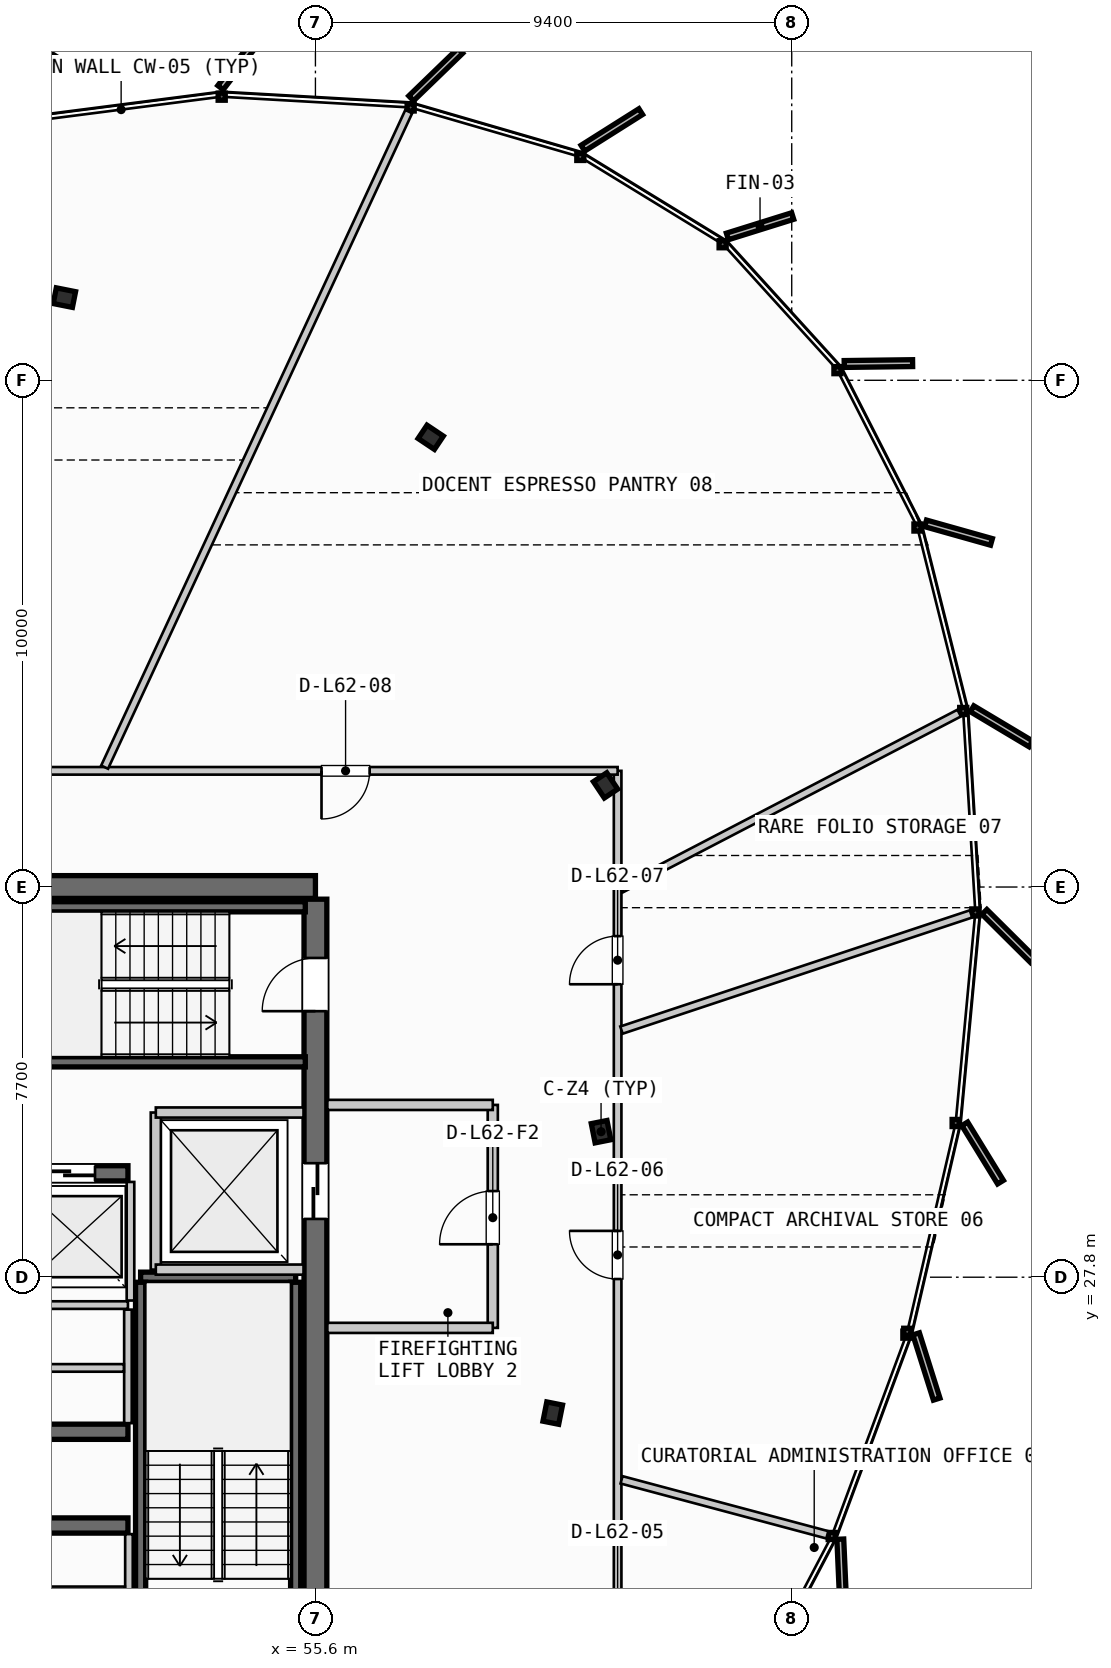
"""IFC4 building model, lengths in metres.
Left out: names, types, materials, properties, quantities, classifications, styles, units other than length and angle.
Written with IfcOpenShell. Run it as: python <this file> out.ifc"""

import sys

from ifc_helpers import new_model, si_unit, direction, frame, frame_2d, origin, origin_2d, place, context, subcontext, project, spatial, rectangle, i_section, extrude, source, transform, mapped, element, fill, save


model = new_model("IFC4")
c1 = context("Model", 3, precision=1e-05, world=origin(), true_north=direction((0.0, 1.0)))
c2 = subcontext(c1, "Body", "Model", "MODEL_VIEW")
j1 = project(units=[si_unit("LENGTHUNIT", "METRE"), si_unit("PLANEANGLEUNIT", "RADIAN")], contexts=[c1])
p1 = place(None, origin())
s1 = spatial("IfcSite", under=j1, at=p1, CompositionType="ELEMENT")
p2 = place(p1, origin())
s2 = spatial("IfcBuilding", under=s1, at=p2, CompositionType="ELEMENT")
p3 = place(p2, frame((0.0, 0.0, 238.75)))
s3 = spatial("IfcBuildingStorey", under=s2, at=p3, CompositionType="ELEMENT", Elevation=238.75)
p4 = place(p3, frame((55.6, 35.5, 0.0), z_axis=(0.0, 0.0, 1.0), x_axis=(-1.0, 0.0, 0.0)))
e1 = element("IfcWall", 1, at=p4, inside=s3, PredefinedType="SHEAR", context=c2, shape_type="SweptSolid", body=[
    extrude(rectangle(XDim=17.6, YDim=0.45, at=frame_2d((8.8, 0.0))), origin(), (0.0, 0.0, 1.0), 3.21),
])
p5 = place(p4, frame((8.05, 0.0, 0.0)))
e2 = element("IfcOpeningElement", 2, at=p5, cuts=e1, PredefinedType="OPENING", context=c2, shape_type="SweptSolid", body=[
    extrude(rectangle(XDim=1.5, YDim=2.2, at=frame_2d((0.75, 1.1))), frame((0.0, 0.235, 0.0), z_axis=(0.0, -1.0, 0.0), x_axis=(1.0, 0.0, 0.0)), (0.0, 0.0, 1.0), 0.47),
])
p6 = place(p4, frame((15.1, 0.0, 0.0)))
e3 = element("IfcOpeningElement", 3, at=p6, cuts=e1, PredefinedType="OPENING", context=c2, shape_type="SweptSolid", body=[
    extrude(rectangle(XDim=0.95, YDim=2.15, at=frame_2d((0.475, 1.075))), frame((0.0, 0.235, 0.0), z_axis=(0.0, -1.0, 0.0), x_axis=(1.0, 0.0, 0.0)), (0.0, 0.0, 1.0), 0.47),
])
p7 = place(p4, frame((12.9, 0.0, 0.0)))
e4 = element("IfcOpeningElement", 4, at=p7, cuts=e1, PredefinedType="OPENING", context=c2, shape_type="SweptSolid", body=[
    extrude(rectangle(XDim=0.9, YDim=2.15, at=frame_2d((0.45, 1.075))), frame((0.0, 0.235, 0.0), z_axis=(0.0, -1.0, 0.0), x_axis=(1.0, 0.0, 0.0)), (0.0, 0.0, 1.0), 0.47),
])
p8 = place(p4, frame((10.6, 0.0, 0.0)))
e5 = element("IfcOpeningElement", 5, at=p8, cuts=e1, PredefinedType="OPENING", context=c2, shape_type="SweptSolid", body=[
    extrude(rectangle(XDim=0.95, YDim=2.15, at=frame_2d((0.475, 1.075))), frame((0.0, 0.235, 0.0), z_axis=(0.0, -1.0, 0.0), x_axis=(1.0, 0.0, 0.0)), (0.0, 0.0, 1.0), 0.47),
])
p9 = place(p3, frame((55.6, 20.34, 0.0), z_axis=(0.0, 0.0, 1.0), x_axis=(0.0, 1.0, 0.0)))
e6 = element("IfcWall", 6, at=p9, inside=s3, PredefinedType="SHEAR", context=c2, shape_type="SweptSolid", body=[
    extrude(rectangle(XDim=14.92, YDim=0.45, at=frame_2d((7.46, 0.0))), origin(), (0.0, 0.0, 1.0), 3.21),
])
p10 = place(p9, frame((12.71, 0.0, 0.0)))
e7 = element("IfcOpeningElement", 7, at=p10, cuts=e6, PredefinedType="OPENING", context=c2, shape_type="SweptSolid", body=[
    extrude(rectangle(XDim=1.05, YDim=2.15, at=frame_2d((0.525, 1.075))), frame((0.0, 0.235, 0.0), z_axis=(0.0, -1.0, 0.0), x_axis=(1.0, 0.0, 0.0)), (0.0, 0.0, 1.0), 0.47),
])
p11 = place(p9, frame((8.61, 0.0, 0.0)))
e8 = element("IfcOpeningElement", 8, at=p11, cuts=e6, PredefinedType="OPENING", context=c2, shape_type="SweptSolid", body=[
    extrude(rectangle(XDim=1.1, YDim=2.2, at=frame_2d((0.55, 1.1))), frame((0.0, 0.235, 0.0), z_axis=(0.0, -1.0, 0.0), x_axis=(1.0, 0.0, 0.0)), (0.0, 0.0, 1.0), 0.47),
])
p12 = place(p3, frame((47.65, 22.9, 0.0), z_axis=(0.0, 0.0, 1.0), x_axis=(1.0, 0.0, 0.0)))
e9 = element("IfcWall", 9, at=p12, inside=s3, PredefinedType="SHEAR", context=c2, shape_type="SweptSolid", body=[
    extrude(rectangle(XDim=4.25, YDim=0.3, at=frame_2d((2.125, 0.0))), origin(), (0.0, 0.0, 1.0), 3.21),
])
p13 = place(p3, frame((47.65, 24.75, 0.0), z_axis=(0.0, 0.0, 1.0), x_axis=(1.0, 0.0, 0.0)))
e10 = element("IfcWall", 10, at=p13, inside=s3, PredefinedType="SHEAR", context=c2, shape_type="SweptSolid", body=[
    extrude(rectangle(XDim=4.25, YDim=0.3, at=frame_2d((2.125, 0.0))), origin(), (0.0, 0.0, 1.0), 3.21),
])
p14 = place(p13, frame((1.55, 0.0, 0.0)))
e11 = element("IfcOpeningElement", 11, at=p14, cuts=e10, PredefinedType="OPENING", context=c2, shape_type="SweptSolid", body=[
    extrude(rectangle(XDim=0.95, YDim=2.15, at=frame_2d((0.475, 1.075))), frame((0.0, 0.16, 0.0), z_axis=(0.0, -1.0, 0.0), x_axis=(1.0, 0.0, 0.0)), (0.0, 0.0, 1.0), 0.32),
])
p15 = place(p3, frame((47.65, 29.85, 0.0), z_axis=(0.0, 0.0, 1.0), x_axis=(1.0, 0.0, 0.0)))
e12 = element("IfcWall", 12, at=p15, inside=s3, PredefinedType="SHEAR", context=c2, shape_type="SweptSolid", body=[
    extrude(rectangle(XDim=4.25, YDim=0.3, at=frame_2d((2.125, 0.0))), origin(), (0.0, 0.0, 1.0), 3.21),
])
p16 = place(p15, frame((0.45, 0.0, 0.0)))
e13 = element("IfcOpeningElement", 13, at=p16, cuts=e12, PredefinedType="OPENING", context=c2, shape_type="SweptSolid", body=[
    extrude(rectangle(XDim=1.1, YDim=2.2, at=frame_2d((0.55, 1.1))), frame((0.0, 0.16, 0.0), z_axis=(0.0, -1.0, 0.0), x_axis=(1.0, 0.0, 0.0)), (0.0, 0.0, 1.0), 0.32),
])
p17 = place(p15, frame((2.5, 0.0, 0.0)))
e14 = element("IfcOpeningElement", 14, at=p17, cuts=e12, PredefinedType="OPENING", context=c2, shape_type="SweptSolid", body=[
    extrude(rectangle(XDim=1.1, YDim=2.2, at=frame_2d((0.55, 1.1))), frame((0.0, 0.16, 0.0), z_axis=(0.0, -1.0, 0.0), x_axis=(1.0, 0.0, 0.0)), (0.0, 0.0, 1.0), 0.32),
])
m1 = source(origin(), c2, "Body", "SweptSolid", [
    extrude(i_section(OverallWidth=0.387, OverallDepth=0.316, WebThickness=0.019, FlangeThickness=0.028, FilletRadius=0.015, at=origin_2d()), origin(), (0.0, 0.0, 1.0), 3.21),
])
for number, where, z_axis, x_axis in (
    (15, (61.237, 30.672, 0.0), (0.0, 0.0, 1.0), (0.981, 0.195, 0.0)),
    (16, (61.326, 37.506, 0.0), (0.0, 0.0, 1.0), (0.831, 0.556, 0.0)),
    (17, (57.875, 44.375, 0.0), (0.0, 0.0, 1.0), (0.556, 0.831, 0.0)),
    (18, (50.645, 47.132, 0.0), (0.0, 0.0, 1.0), (0.195, 0.981, 0.0)),
    (19, (60.284, 25.118, 0.0), (0.0, 0.0, 1.0), (0.981, -0.195, 0.0)),
):
    element("IfcColumn", number, at=place(p3, frame(where, z_axis=z_axis, x_axis=x_axis)), inside=s3, PredefinedType="COLUMN", context=c2, shape_type="MappedRepresentation", body=[
        mapped(m1, transform((0.0, 0.0, 0.0), scale=1.0)),
    ])
p18 = place(p3, frame((52.15, 27.8, 0.0), z_axis=(0.0, 0.0, 1.0), x_axis=(1.0, 0.0, 0.0)))
e20 = element("IfcWall", 20, at=p18, inside=s3, PredefinedType="SHEAR", context=c2, shape_type="SweptSolid", body=[
    extrude(rectangle(XDim=3.06, YDim=0.2, at=frame_2d((1.53, 0.0))), origin(), (0.0, 0.0, 1.0), 3.21),
])
for number, where, z_axis, x_axis in (
    (21, (55.21, 27.7, 0.0), (0.0, 0.0, 1.0), (0.0, -1.0, 0.0)),
    (22, (52.15, 20.35, 0.0), (0.0, 0.0, 1.0), (0.0, 1.0, 0.0)),
    (23, (48.05, 35.11, 0.0), (0.0, 0.0, 1.0), (1.0, 0.0, 0.0)),
    (24, (55.4, 32.05, 0.0), (0.0, 0.0, 1.0), (-1.0, 0.0, 0.0)),
):
    element("IfcWall", number, at=place(p3, frame(where, z_axis=z_axis, x_axis=x_axis)), inside=s3, PredefinedType="SHEAR", context=c2, shape_type="SweptSolid", body=[
        extrude(rectangle(XDim=7.35, YDim=0.2, at=frame_2d((3.675, 0.0))), origin(), (0.0, 0.0, 1.0), 3.21),
    ])
p19 = place(p3, frame((52.45, 27.95, 0.0), z_axis=(0.0, 0.0, 1.0), x_axis=(0.0, 1.0, 0.0)))
e25 = element("IfcWall", 25, at=p19, inside=s3, PredefinedType="PARTITIONING", context=c2, shape_type="SweptSolid", body=[
    extrude(rectangle(XDim=3.1, YDim=0.2, at=frame_2d((1.55, 0.0))), origin(), (0.0, 0.0, 1.0), 2.28),
])
for number, where, z_axis, x_axis in (
    (26, (52.45, 27.95, 0.0), (0.0, 0.0, 1.0), (1.0, 0.0, 0.0)),
    (27, (52.45, 31.05, 0.0), (0.0, 0.0, 1.0), (1.0, 0.0, 0.0)),
):
    element("IfcWall", number, at=place(p3, frame(where, z_axis=z_axis, x_axis=x_axis)), inside=s3, PredefinedType="PARTITIONING", context=c2, shape_type="SweptSolid", body=[
        extrude(rectangle(XDim=2.915, YDim=0.2, at=frame_2d((1.458, 0.0))), origin(), (0.0, 0.0, 1.0), 2.28),
    ])
p20 = place(p3, frame((59.1, 26.8, 0.0), z_axis=(0.0, 0.0, 1.0), x_axis=(0.0, 1.0, 0.0)))
e28 = element("IfcWall", 28, at=p20, inside=s3, PredefinedType="PARTITIONING", context=c2, shape_type="SweptSolid", body=[
    extrude(rectangle(XDim=4.4, YDim=0.2, at=frame_2d((2.2, 0.0))), origin(), (0.0, 0.0, 1.0), 2.28),
])
p21 = place(p20, frame((1.65, 0.0, 0.0)))
e29 = element("IfcOpeningElement", 29, at=p21, cuts=e28, PredefinedType="OPENING", context=c2, shape_type="SweptSolid", body=[
    extrude(rectangle(XDim=1.05, YDim=2.15, at=frame_2d((0.525, 1.075))), frame((0.0, 0.11, 0.0), z_axis=(0.0, -1.0, 0.0), x_axis=(1.0, 0.0, 0.0)), (0.0, 0.0, 1.0), 0.22),
])
for number, where, z_axis, x_axis in (
    (30, (55.835, 26.8, 0.0), (0.0, 0.0, 1.0), (1.0, 0.0, 0.0)),
    (31, (55.835, 31.2, 0.0), (0.0, 0.0, 1.0), (1.0, 0.0, 0.0)),
):
    element("IfcWall", number, at=place(p3, frame(where, z_axis=z_axis, x_axis=x_axis)), inside=s3, PredefinedType="PARTITIONING", context=c2, shape_type="SweptSolid", body=[
        extrude(rectangle(XDim=3.265, YDim=0.2, at=frame_2d((1.633, 0.0))), origin(), (0.0, 0.0, 1.0), 2.28),
    ])
p22 = place(p3, frame((51.92, 20.335, 0.0), z_axis=(0.0, 0.0, 1.0), x_axis=(0.0, 1.0, 0.0)))
e32 = element("IfcWall", 32, at=p22, inside=s3, PredefinedType="PARTITIONING", context=c2, shape_type="SweptSolid", body=[
    extrude(rectangle(XDim=2.395, YDim=0.15, at=frame_2d((1.198, 0.0))), origin(), (0.0, 0.0, 1.0), 2.28),
])
p23 = place(p3, frame((47.88, 21.62, 0.0), z_axis=(0.0, 0.0, 1.0), x_axis=(1.0, 0.0, 0.0)))
e33 = element("IfcWall", 33, at=p23, inside=s3, PredefinedType="PARTITIONING", context=c2, shape_type="SweptSolid", body=[
    extrude(rectangle(XDim=3.96, YDim=0.15, at=frame_2d((1.98, 0.0))), origin(), (0.0, 0.0, 1.0), 2.28),
])
p24 = place(p23, frame((1.55, 0.0, 0.0)))
e34 = element("IfcOpeningElement", 34, at=p24, cuts=e33, PredefinedType="OPENING", context=c2, shape_type="SweptSolid", body=[
    extrude(rectangle(XDim=0.85, YDim=2.15, at=frame_2d((0.425, 1.075))), frame((0.0, 0.085, 0.0), z_axis=(0.0, -1.0, 0.0), x_axis=(1.0, 0.0, 0.0)), (0.0, 0.0, 1.0), 0.17),
])
p25 = place(p3, frame((47.65, 27.25, 0.0), z_axis=(0.0, 0.0, 1.0), x_axis=(1.0, 0.0, 0.0)))
e35 = element("IfcWall", 35, at=p25, inside=s3, PredefinedType="PARTITIONING", context=c2, shape_type="SweptSolid", body=[
    extrude(rectangle(XDim=4.25, YDim=0.15, at=frame_2d((2.125, 0.0))), origin(), (0.0, 0.0, 1.0), 2.28),
])
p26 = place(p3, frame((51.9, 24.92, 0.0), z_axis=(0.0, 0.0, 1.0), x_axis=(0.0, 1.0, 0.0)))
e36 = element("IfcWall", 36, at=p26, inside=s3, PredefinedType="PARTITIONING", context=c2, shape_type="SweptSolid", body=[
    extrude(rectangle(XDim=2.24, YDim=0.15, at=frame_2d((1.12, 0.0))), origin(), (0.0, 0.0, 1.0), 2.28),
])
p27 = place(p3, frame((47.73, 26.01, 0.0), z_axis=(0.0, 0.0, 1.0), x_axis=(1.0, 0.0, 0.0)))
e37 = element("IfcWall", 37, at=p27, inside=s3, PredefinedType="PARTITIONING", context=c2, shape_type="SweptSolid", body=[
    extrude(rectangle(XDim=4.09, YDim=0.15, at=frame_2d((2.045, 0.0))), origin(), (0.0, 0.0, 1.0), 2.28),
])
p28 = place(p27, frame((1.6, 0.0, 0.0)))
e38 = element("IfcOpeningElement", 38, at=p28, cuts=e37, PredefinedType="OPENING", context=c2, shape_type="SweptSolid", body=[
    extrude(rectangle(XDim=0.85, YDim=2.15, at=frame_2d((0.425, 1.075))), frame((0.0, 0.085, 0.0), z_axis=(0.0, -1.0, 0.0), x_axis=(1.0, 0.0, 0.0)), (0.0, 0.0, 1.0), 0.17),
])
p29 = place(p3, frame((51.95, 27.34, 0.0), z_axis=(0.0, 0.0, 1.0), x_axis=(0.0, 1.0, 0.0)))
e39 = element("IfcWall", 39, at=p29, inside=s3, PredefinedType="PARTITIONING", context=c2, shape_type="SweptSolid", body=[
    extrude(rectangle(XDim=2.34, YDim=0.15, at=frame_2d((1.17, 0.0))), origin(), (0.0, 0.0, 1.0), 2.28),
])
p30 = place(p3, frame((61.564, 17.807, 0.0), z_axis=(0.0, 0.0, 1.0), x_axis=(0.0, 1.0, 0.0)))
e40 = element("IfcWall", 40, at=p30, inside=s3, PredefinedType="PARTITIONING", context=c2, shape_type="SweptSolid", body=[
    extrude(rectangle(XDim=19.986, YDim=0.15, at=frame_2d((9.993, 0.0))), origin(), (0.0, 0.0, 1.0), 2.28),
])
p31 = place(p30, frame((2.823, 0.0, 0.0)))
e41 = element("IfcOpeningElement", 41, at=p31, cuts=e40, PredefinedType="OPENING", context=c2, shape_type="SweptSolid", body=[
    extrude(rectangle(XDim=0.95, YDim=2.15, at=frame_2d((0.475, 1.075))), frame((0.0, 0.085, 0.0), z_axis=(0.0, -1.0, 0.0), x_axis=(1.0, 0.0, 0.0)), (0.0, 0.0, 1.0), 0.17),
])
p32 = place(p30, frame((9.957, 0.0, 0.0)))
e42 = element("IfcOpeningElement", 42, at=p32, cuts=e40, PredefinedType="OPENING", context=c2, shape_type="SweptSolid", body=[
    extrude(rectangle(XDim=0.95, YDim=2.15, at=frame_2d((0.475, 1.075))), frame((0.0, 0.085, 0.0), z_axis=(0.0, -1.0, 0.0), x_axis=(1.0, 0.0, 0.0)), (0.0, 0.0, 1.0), 0.17),
])
p33 = place(p30, frame((15.774, 0.0, 0.0)))
e43 = element("IfcOpeningElement", 43, at=p33, cuts=e40, PredefinedType="OPENING", context=c2, shape_type="SweptSolid", body=[
    extrude(rectangle(XDim=0.95, YDim=2.15, at=frame_2d((0.475, 1.075))), frame((0.0, 0.085, 0.0), z_axis=(0.0, -1.0, 0.0), x_axis=(1.0, 0.0, 0.0)), (0.0, 0.0, 1.0), 0.17),
])
p34 = place(p3, frame((61.564, 37.793, 0.0), z_axis=(0.0, 0.0, 1.0), x_axis=(-1.0, 0.0, 0.0)))
e44 = element("IfcWall", 44, at=p34, inside=s3, PredefinedType="PARTITIONING", context=c2, shape_type="SweptSolid", body=[
    extrude(rectangle(XDim=30.274, YDim=0.15, at=frame_2d((15.137, 0.0))), origin(), (0.0, 0.0, 1.0), 2.28),
])
p35 = place(p34, frame((4.894, 0.0, 0.0)))
e45 = element("IfcOpeningElement", 45, at=p35, cuts=e44, PredefinedType="OPENING", context=c2, shape_type="SweptSolid", body=[
    extrude(rectangle(XDim=0.95, YDim=2.15, at=frame_2d((0.475, 1.075))), frame((0.0, 0.085, 0.0), z_axis=(0.0, -1.0, 0.0), x_axis=(1.0, 0.0, 0.0)), (0.0, 0.0, 1.0), 0.17),
])
p36 = place(p34, frame((14.412, 0.0, 0.0)))
e46 = element("IfcOpeningElement", 46, at=p36, cuts=e44, PredefinedType="OPENING", context=c2, shape_type="SweptSolid", body=[
    extrude(rectangle(XDim=0.95, YDim=2.15, at=frame_2d((0.475, 1.075))), frame((0.0, 0.085, 0.0), z_axis=(0.0, -1.0, 0.0), x_axis=(1.0, 0.0, 0.0)), (0.0, 0.0, 1.0), 0.17),
])
p37 = place(p34, frame((24.178, 0.0, 0.0)))
e47 = element("IfcOpeningElement", 47, at=p37, cuts=e44, PredefinedType="OPENING", context=c2, shape_type="SweptSolid", body=[
    extrude(rectangle(XDim=0.95, YDim=2.15, at=frame_2d((0.475, 1.075))), frame((0.0, 0.085, 0.0), z_axis=(0.0, -1.0, 0.0), x_axis=(1.0, 0.0, 0.0)), (0.0, 0.0, 1.0), 0.17),
])
p38 = place(p3, frame((61.641, 23.802, 0.0), z_axis=(0.0, 0.0, 1.0), x_axis=(0.966112425525, -0.258121640407, 0.0)))
e48 = element("IfcWall", 48, at=p38, inside=s3, PredefinedType="PARTITIONING", context=c2, shape_type="SweptSolid", body=[
    extrude(rectangle(XDim=4.204, YDim=0.15, at=frame_2d((2.102, 0.0))), origin(), (0.0, 0.0, 1.0), 2.28),
])
p39 = place(p3, frame((61.64, 32.677, 0.0), z_axis=(0.0, 0.0, 1.0), x_axis=(0.948948286782, 0.315431686762, 0.0)))
e49 = element("IfcWall", 49, at=p39, inside=s3, PredefinedType="PARTITIONING", context=c2, shape_type="SweptSolid", body=[
    extrude(rectangle(XDim=7.269, YDim=0.15, at=frame_2d((3.635, 0.0))), origin(), (0.0, 0.0, 1.0), 2.28),
])
p40 = place(p3, frame((61.635, 35.462, 0.0), z_axis=(0.0, 0.0, 1.0), x_axis=(0.887115767251, 0.461546980809, 0.0)))
e50 = element("IfcWall", 50, at=p40, inside=s3, PredefinedType="PARTITIONING", context=c2, shape_type="SweptSolid", body=[
    extrude(rectangle(XDim=7.519, YDim=0.15, at=frame_2d((3.759, 0.0))), origin(), (0.0, 0.0, 1.0), 2.28),
])
p41 = place(p3, frame((51.439, 37.865, 0.0), z_axis=(0.0, 0.0, 1.0), x_axis=(0.420885460342, 0.907113790697, 0.0)))
e51 = element("IfcWall", 51, at=p41, inside=s3, PredefinedType="PARTITIONING", context=c2, shape_type="SweptSolid", body=[
    extrude(rectangle(XDim=14.261, YDim=0.15, at=frame_2d((7.131, 0.0))), origin(), (0.0, 0.0, 1.0), 2.28),
])
m2 = source(origin(), c2, "Body", "SweptSolid", [
    extrude(rectangle(XDim=1.05, YDim=2.15, at=frame_2d((0.525, 1.075))), frame((0.0, 0.025, 0.0), z_axis=(0.0, -1.0, 0.0), x_axis=(1.0, 0.0, 0.0)), (0.0, 0.0, 1.0), 0.05),
])
p42 = place(p10, origin())
e52 = element("IfcDoor", 52, at=p42, inside=s3, OperationType="SINGLE_SWING_LEFT", PredefinedType="DOOR", context=c2, shape_type="MappedRepresentation", body=[
    mapped(m2, transform((0.0, 0.0, 0.0), scale=1.0)),
])
fill(e7, e52)
m3 = source(origin(), c2, "Body", "SweptSolid", [
    extrude(rectangle(XDim=1.1, YDim=2.2, at=frame_2d((0.55, 1.1))), frame((0.0, 0.025, 0.0), z_axis=(0.0, -1.0, 0.0), x_axis=(1.0, 0.0, 0.0)), (0.0, 0.0, 1.0), 0.05),
])
p43 = place(p11, origin())
e53 = element("IfcDoor", 53, at=p43, inside=s3, OperationType="SLIDING_TO_RIGHT", PredefinedType="DOOR", context=c2, shape_type="MappedRepresentation", body=[
    mapped(m3, transform((0.0, 0.0, 0.0), scale=1.0)),
])
fill(e8, e53)
p44 = place(p17, origin())
e54 = element("IfcDoor", 54, at=p44, inside=s3, OperationType="SLIDING_TO_LEFT", PredefinedType="DOOR", context=c2, shape_type="MappedRepresentation", body=[
    mapped(m3, transform((0.0, 0.0, 0.0), scale=1.0)),
])
fill(e14, e54)
p45 = place(p21, origin())
e55 = element("IfcDoor", 55, at=p45, inside=s3, OperationType="SINGLE_SWING_LEFT", PredefinedType="DOOR", context=c2, shape_type="MappedRepresentation", body=[
    mapped(m2, transform((0.0, 0.0, 0.0), scale=1.0)),
])
fill(e29, e55)
m4 = source(origin(), c2, "Body", "SweptSolid", [
    extrude(rectangle(XDim=0.95, YDim=2.15, at=frame_2d((0.475, 1.075))), frame((0.0, 0.025, 0.0), z_axis=(0.0, -1.0, 0.0), x_axis=(1.0, 0.0, 0.0)), (0.0, 0.0, 1.0), 0.05),
])
p46 = place(p32, origin())
e56 = element("IfcDoor", 56, at=p46, inside=s3, OperationType="SINGLE_SWING_RIGHT", PredefinedType="DOOR", context=c2, shape_type="MappedRepresentation", body=[
    mapped(m4, transform((0.0, 0.0, 0.0), scale=1.0)),
])
fill(e42, e56)
p47 = place(p33, origin())
e57 = element("IfcDoor", 57, at=p47, inside=s3, OperationType="SINGLE_SWING_LEFT", PredefinedType="DOOR", context=c2, shape_type="MappedRepresentation", body=[
    mapped(m4, transform((0.0, 0.0, 0.0), scale=1.0)),
])
fill(e43, e57)
p48 = place(p35, origin())
e58 = element("IfcDoor", 58, at=p48, inside=s3, OperationType="SINGLE_SWING_RIGHT", PredefinedType="DOOR", context=c2, shape_type="MappedRepresentation", body=[
    mapped(m4, transform((0.0, 0.0, 0.0), scale=1.0)),
])
fill(e45, e58)
save(model, sys.argv[1])
